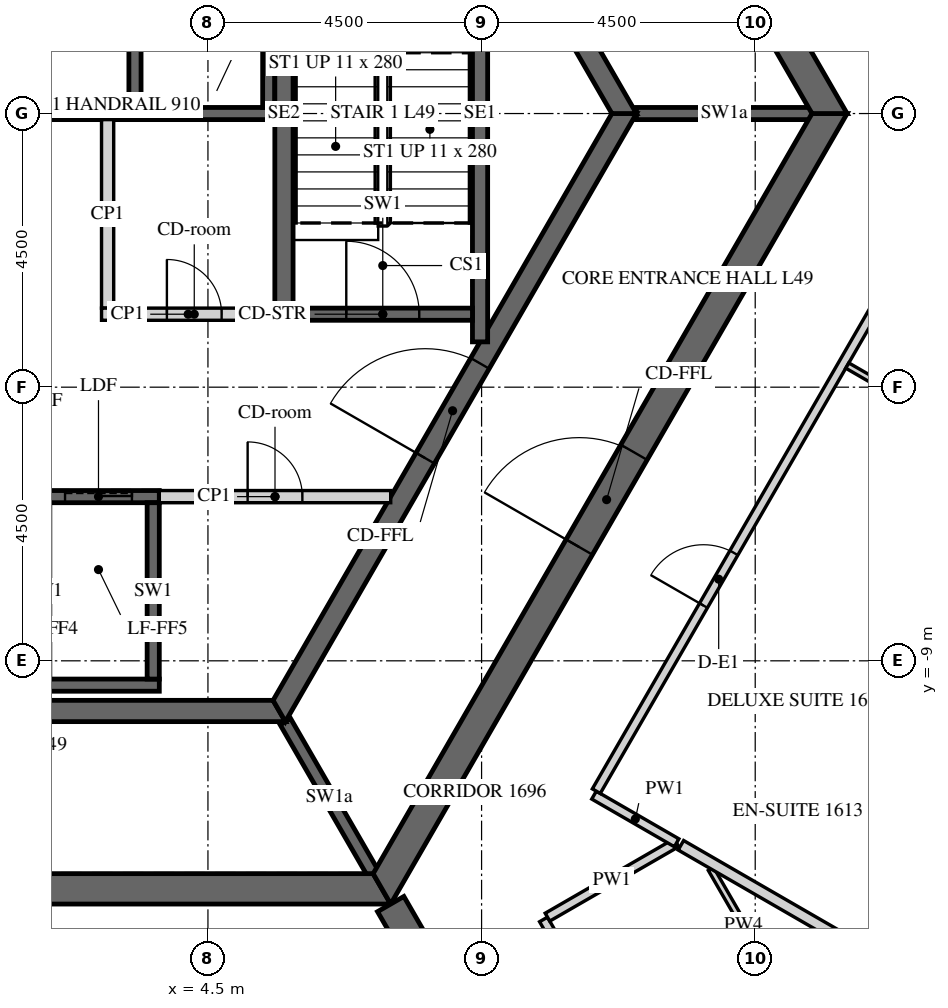
"""IFC4 building model, lengths in metres.
Left out: names, types, materials, properties, quantities, classifications, styles, units other than length and angle.
Written with IfcOpenShell. Run it as: python <this file> out.ifc"""

import sys

from ifc_helpers import new_model, si_unit, direction, frame, frame_2d, origin, place, context, subcontext, project, spatial, polyline, rectangle, outline, extrude, element, fill, save


model = new_model("IFC4")
c1 = context("Model", 3, precision=1e-05, world=origin(), true_north=direction((0.0, 1.0)))
c2 = subcontext(c1, "Body", "Model", "MODEL_VIEW")
j1 = project(units=[si_unit("LENGTHUNIT", "METRE"), si_unit("PLANEANGLEUNIT", "RADIAN")], contexts=[c1])
p1 = place(None, origin())
s1 = spatial("IfcSite", under=j1, at=p1, CompositionType="ELEMENT")
p2 = place(p1, origin())
s2 = spatial("IfcBuilding", under=s1, at=p2, CompositionType="ELEMENT")
p3 = place(p2, frame((0.0, 0.0, 207.3)))
s3 = spatial("IfcBuildingStorey", under=s2, at=p3, CompositionType="ELEMENT", Elevation=207.3)
p4 = place(p3, frame((-7.361, -12.75, -0.15), z_axis=(0.0, 0.0, 1.0), x_axis=(1.0, 0.0, 0.0)))
e1 = element("IfcWall", 1, at=p4, inside=s3, PredefinedType="SHEAR", context=c2, shape_type="SweptSolid", body=[
    extrude(outline(polyline([(-0.144, -0.25), (14.866, -0.25), (14.578, 0.25), (0.144, 0.25), (-0.144, -0.25)])), origin(), (0.0, 0.0, 1.0), 3.9),
])
p5 = place(p4, frame((6.761, 0.0, 0.15)))
e2 = element("IfcOpeningElement", 2, at=p5, cuts=e1, PredefinedType="OPENING", context=c2, shape_type="SweptSolid", body=[
    extrude(rectangle(XDim=1.2, YDim=2.4, at=frame_2d((0.6, 1.2))), frame((0.0, 0.26, 0.0), z_axis=(0.0, -1.0, 0.0), x_axis=(1.0, 0.0, 0.0)), (0.0, 0.0, 1.0), 0.52),
])
p6 = place(p3, frame((7.361, -12.75, -0.15), z_axis=(0.0, 0.0, 1.0), x_axis=(0.50000571537, 0.866022103989, 0.0)))
e3 = element("IfcWall", 3, at=p6, inside=s3, PredefinedType="SHEAR", context=c2, shape_type="SweptSolid", body=[
    extrude(outline(polyline([(-0.144, -0.25), (14.867, -0.25), (14.578, 0.25), (0.144, 0.25), (-0.144, -0.25)])), origin(), (0.0, 0.0, 1.0), 3.9),
])
p7 = place(p6, frame((6.49, 0.0, 0.15)))
e4 = element("IfcOpeningElement", 4, at=p7, cuts=e3, PredefinedType="OPENING", context=c2, shape_type="SweptSolid", body=[
    extrude(rectangle(XDim=1.8, YDim=2.4, at=frame_2d((0.9, 1.2))), frame((0.0, 0.26, 0.0), z_axis=(0.0, -1.0, 0.0), x_axis=(1.0, 0.0, 0.0)), (0.0, 0.0, 1.0), 0.52),
])
p8 = place(p3, frame((14.722, 0.0, -0.15), z_axis=(0.0, 0.0, 1.0), x_axis=(-0.50000571537, 0.866022103989, 0.0)))
e5 = element("IfcWall", 5, at=p8, inside=s3, PredefinedType="SHEAR", context=c2, shape_type="SweptSolid", body=[
    extrude(outline(polyline([(-0.144, -0.25), (14.867, -0.25), (14.578, 0.25), (0.144, 0.25), (-0.144, -0.25)])), origin(), (0.0, 0.0, 1.0), 3.9),
])
p9 = place(p8, frame((6.432, 0.0, 0.15)))
e6 = element("IfcOpeningElement", 6, at=p9, cuts=e5, PredefinedType="OPENING", context=c2, shape_type="SweptSolid", body=[
    extrude(rectangle(XDim=1.8, YDim=2.4, at=frame_2d((0.9, 1.2))), frame((0.0, 0.26, 0.0), z_axis=(0.0, -1.0, 0.0), x_axis=(1.0, 0.0, 0.0)), (0.0, 0.0, 1.0), 0.52),
])
p10 = place(p3, frame((7.506, -13.0, -0.15), z_axis=(0.0, 0.0, 1.0), x_axis=(0.499988271576, -0.866032175087, 0.0)))
e7 = element("IfcWall", 7, at=p10, inside=s3, PredefinedType="SHEAR", context=c2, shape_type="SweptSolid", body=[
    extrude(rectangle(XDim=15.424, YDim=0.5, at=frame_2d((7.712, 0.0))), origin(), (0.0, 0.0, 1.0), 3.9),
])
p11 = place(p10, frame((6.812, 0.0, 0.15)))
e8 = element("IfcOpeningElement", 8, at=p11, cuts=e7, PredefinedType="OPENING", context=c2, shape_type="SweptSolid", body=[
    extrude(rectangle(XDim=1.8, YDim=2.4, at=frame_2d((0.9, 1.2))), frame((0.0, 0.26, 0.0), z_axis=(0.0, -1.0, 0.0), x_axis=(1.0, 0.0, 0.0)), (0.0, 0.0, 1.0), 0.52),
])
p12 = place(p3, frame((-5.673, -9.825, -0.15), z_axis=(0.0, 0.0, 1.0), x_axis=(1.0, 0.0, 0.0)))
e9 = element("IfcWall", 9, at=p12, inside=s3, PredefinedType="SHEAR", context=c2, shape_type="SweptSolid", body=[
    extrude(outline(polyline([(-0.101, -0.175), (11.446, -0.175), (11.244, 0.175), (0.101, 0.175), (-0.101, -0.175)])), origin(), (0.0, 0.0, 1.0), 3.9),
])
p13 = place(p3, frame((5.673, -9.825, -0.15), z_axis=(0.0, 0.0, 1.0), x_axis=(0.499995046907, 0.866028263435, 0.0)))
e10 = element("IfcWall", 10, at=p13, inside=s3, PredefinedType="SHEAR", context=c2, shape_type="SweptSolid", body=[
    extrude(outline(polyline([(-0.101, -0.175), (11.446, -0.175), (11.244, 0.175), (0.101, 0.175), (-0.101, -0.175)])), origin(), (0.0, 0.0, 1.0), 3.9),
])
p14 = place(p13, frame((4.801, 0.0, 0.15)))
e11 = element("IfcOpeningElement", 11, at=p14, cuts=e10, PredefinedType="OPENING", context=c2, shape_type="SweptSolid", body=[
    extrude(rectangle(XDim=1.8, YDim=2.4, at=frame_2d((0.9, 1.2))), frame((0.0, 0.185, 0.0), z_axis=(0.0, -1.0, 0.0), x_axis=(1.0, 0.0, 0.0)), (0.0, 0.0, 1.0), 0.37),
])
p15 = place(p3, frame((11.345, 0.0, -0.15), z_axis=(0.0, 0.0, 1.0), x_axis=(-0.499995046907, 0.866028263435, 0.0)))
e12 = element("IfcWall", 12, at=p15, inside=s3, PredefinedType="SHEAR", context=c2, shape_type="SweptSolid", body=[
    extrude(outline(polyline([(-0.101, -0.175), (11.446, -0.175), (11.244, 0.175), (0.101, 0.175), (-0.101, -0.175)])), origin(), (0.0, 0.0, 1.0), 3.9),
])
p16 = place(p15, frame((4.744, 0.0, 0.15)))
e13 = element("IfcOpeningElement", 13, at=p16, cuts=e12, PredefinedType="OPENING", context=c2, shape_type="SweptSolid", body=[
    extrude(rectangle(XDim=1.8, YDim=2.4, at=frame_2d((0.9, 1.2))), frame((0.0, 0.185, 0.0), z_axis=(0.0, -1.0, 0.0), x_axis=(1.0, 0.0, 0.0)), (0.0, 0.0, 1.0), 0.37),
])
p17 = place(p3, frame((-5.6, 0.0, -0.25), z_axis=(0.0, 0.0, 1.0), x_axis=(1.0, 0.0, 0.0)))
e14 = element("IfcWall", 14, at=p17, inside=s3, PredefinedType="SHEAR", context=c2, shape_type="SweptSolid", body=[
    extrude(rectangle(XDim=11.2, YDim=0.2, at=frame_2d((5.6, 0.0))), origin(), (0.0, 0.0, 1.0), 3.9),
])
for number, where, z_axis, x_axis in (
    (15, (3.3, 0.1, -0.25), (0.0, 0.0, 1.0), (0.0, 1.0, 0.0)),
    (16, (5.5, 0.1, -0.25), (0.0, 0.0, 1.0), (0.0, 1.0, 0.0)),
):
    element("IfcWall", number, at=place(p3, frame(where, z_axis=z_axis, x_axis=x_axis)), inside=s3, PredefinedType="SHEAR", context=c2, shape_type="SweptSolid", body=[
        extrude(rectangle(XDim=3.1, YDim=0.2, at=frame_2d((1.55, 0.0))), origin(), (0.0, 0.0, 1.0), 3.9),
    ])
p18 = place(p3, frame((-5.5, -6.3, -0.25), z_axis=(0.0, 0.0, 1.0), x_axis=(1.0, 0.0, 0.0)))
e17 = element("IfcWall", 17, at=p18, inside=s3, PredefinedType="SHEAR", context=c2, shape_type="SweptSolid", body=[
    extrude(rectangle(XDim=9.2, YDim=0.2, at=frame_2d((4.6, 0.0))), origin(), (0.0, 0.0, 1.0), 3.9),
])
p19 = place(p18, frame((0.45, 0.0, 0.25)))
e18 = element("IfcOpeningElement", 18, at=p19, cuts=e17, PredefinedType="OPENING", context=c2, shape_type="SweptSolid", body=[
    extrude(rectangle(XDim=1.1, YDim=2.1, at=frame_2d((0.55, 1.05))), frame((0.0, 0.11, 0.0), z_axis=(0.0, -1.0, 0.0), x_axis=(1.0, 0.0, 0.0)), (0.0, 0.0, 1.0), 0.22),
])
p20 = place(p18, frame((2.25, 0.0, 0.25)))
e19 = element("IfcOpeningElement", 19, at=p20, cuts=e17, PredefinedType="OPENING", context=c2, shape_type="SweptSolid", body=[
    extrude(rectangle(XDim=1.1, YDim=2.1, at=frame_2d((0.55, 1.05))), frame((0.0, 0.11, 0.0), z_axis=(0.0, -1.0, 0.0), x_axis=(1.0, 0.0, 0.0)), (0.0, 0.0, 1.0), 0.22),
])
p21 = place(p18, frame((4.05, 0.0, 0.25)))
e20 = element("IfcOpeningElement", 20, at=p21, cuts=e17, PredefinedType="OPENING", context=c2, shape_type="SweptSolid", body=[
    extrude(rectangle(XDim=1.1, YDim=2.1, at=frame_2d((0.55, 1.05))), frame((0.0, 0.11, 0.0), z_axis=(0.0, -1.0, 0.0), x_axis=(1.0, 0.0, 0.0)), (0.0, 0.0, 1.0), 0.22),
])
p22 = place(p18, frame((5.85, 0.0, 0.25)))
e21 = element("IfcOpeningElement", 21, at=p22, cuts=e17, PredefinedType="OPENING", context=c2, shape_type="SweptSolid", body=[
    extrude(rectangle(XDim=1.1, YDim=2.1, at=frame_2d((0.55, 1.05))), frame((0.0, 0.11, 0.0), z_axis=(0.0, -1.0, 0.0), x_axis=(1.0, 0.0, 0.0)), (0.0, 0.0, 1.0), 0.22),
])
p23 = place(p18, frame((7.65, 0.0, 0.25)))
e22 = element("IfcOpeningElement", 22, at=p23, cuts=e17, PredefinedType="OPENING", context=c2, shape_type="SweptSolid", body=[
    extrude(rectangle(XDim=1.1, YDim=2.1, at=frame_2d((0.55, 1.05))), frame((0.0, 0.11, 0.0), z_axis=(0.0, -1.0, 0.0), x_axis=(1.0, 0.0, 0.0)), (0.0, 0.0, 1.0), 0.22),
])
p24 = place(p3, frame((-5.5, -9.4, -0.25), z_axis=(0.0, 0.0, 1.0), x_axis=(1.0, 0.0, 0.0)))
e23 = element("IfcWall", 23, at=p24, inside=s3, PredefinedType="SHEAR", context=c2, shape_type="SweptSolid", body=[
    extrude(rectangle(XDim=9.2, YDim=0.2, at=frame_2d((4.6, 0.0))), origin(), (0.0, 0.0, 1.0), 3.9),
])
p25 = place(p3, frame((3.6, -9.3, -0.25), z_axis=(0.0, 0.0, 1.0), x_axis=(0.0, 1.0, 0.0)))
e24 = element("IfcWall", 24, at=p25, inside=s3, PredefinedType="SHEAR", context=c2, shape_type="SweptSolid", body=[
    extrude(rectangle(XDim=2.9, YDim=0.2, at=frame_2d((1.45, 0.0))), origin(), (0.0, 0.0, 1.0), 3.9),
])
p26 = place(p3, frame((2.75, -3.3, 0.0), z_axis=(0.0, 0.0, 1.0), x_axis=(1.0, 0.0, 0.0)))
e25 = element("IfcWall", 25, at=p26, inside=s3, PredefinedType="PARTITIONING", context=c2, shape_type="SweptSolid", body=[
    extrude(rectangle(XDim=2.85, YDim=0.2, at=frame_2d((1.425, 0.0))), origin(), (0.0, 0.0, 1.0), 3.65),
])
p27 = place(p26, frame((1.075, 0.0, 0.0)))
e26 = element("IfcOpeningElement", 26, at=p27, cuts=e25, PredefinedType="OPENING", context=c2, shape_type="SweptSolid", body=[
    extrude(rectangle(XDim=0.9, YDim=2.1, at=frame_2d((0.45, 1.05))), frame((0.0, 0.11, 0.0), z_axis=(0.0, -1.0, 0.0), x_axis=(1.0, 0.0, 0.0)), (0.0, 0.0, 1.0), 0.22),
])
p28 = place(p3, frame((2.85, -3.2, 0.0), z_axis=(0.0, 0.0, 1.0), x_axis=(0.0, 1.0, 0.0)))
e27 = element("IfcWall", 27, at=p28, inside=s3, PredefinedType="PARTITIONING", context=c2, shape_type="SweptSolid", body=[
    extrude(rectangle(XDim=3.1, YDim=0.2, at=frame_2d((1.55, 0.0))), origin(), (0.0, 0.0, 1.0), 3.65),
])
p29 = place(p3, frame((3.7, -6.3, 0.0), z_axis=(0.0, 0.0, 1.0), x_axis=(1.0, 0.0, 0.0)))
e28 = element("IfcWall", 28, at=p29, inside=s3, PredefinedType="PARTITIONING", context=c2, shape_type="SweptSolid", body=[
    extrude(rectangle(XDim=3.806, YDim=0.2, at=frame_2d((1.903, 0.0))), origin(), (0.0, 0.0, 1.0), 3.65),
])
p30 = place(p29, frame((1.453, 0.0, 0.0)))
e29 = element("IfcOpeningElement", 29, at=p30, cuts=e28, PredefinedType="OPENING", context=c2, shape_type="SweptSolid", body=[
    extrude(rectangle(XDim=0.9, YDim=2.1, at=frame_2d((0.45, 1.05))), frame((0.0, 0.11, 0.0), z_axis=(0.0, -1.0, 0.0), x_axis=(1.0, 0.0, 0.0)), (0.0, 0.0, 1.0), 0.22),
])
for number, where, z_axis, x_axis in (
    (30, (11.547, 0.0, -0.15), (0.0, 0.0, 1.0), (1.0, 0.0, 0.0)),
    (31, (5.773, -10.0, -0.15), (0.0, 0.0, 1.0), (0.5, -0.866, 0.0)),
):
    element("IfcWall", number, at=place(p3, frame(where, z_axis=z_axis, x_axis=x_axis)), inside=s3, PredefinedType="SHEAR", context=c2, shape_type="SweptSolid", body=[
        extrude(rectangle(XDim=2.887, YDim=0.2, at=frame_2d((1.443, 0.0))), origin(), (0.0, 0.0, 1.0), 3.9),
    ])
p31 = place(p3, frame((5.75, -3.4, -0.25), z_axis=(0.0, 0.0, 1.0), x_axis=(0.0, 1.0, 0.0)))
e32 = element("IfcWall", 32, at=p31, inside=s3, PredefinedType="SHEAR", context=c2, shape_type="SweptSolid", body=[
    extrude(rectangle(XDim=6.8, YDim=0.3, at=frame_2d((3.4, 0.0))), origin(), (0.0, 0.0, 1.0), 3.9),
])
p32 = place(p3, frame((8.975, -3.755, -0.25), z_axis=(0.0, 0.0, 1.0), x_axis=(0.0, 1.0, 0.0)))
e33 = element("IfcWall", 33, at=p32, inside=s3, PredefinedType="SHEAR", context=c2, shape_type="SweptSolid", body=[
    extrude(rectangle(XDim=7.51, YDim=0.25, at=frame_2d((3.755, 0.0))), origin(), (0.0, 0.0, 1.0), 3.9),
])
p33 = place(p3, frame((5.9, -3.3, -0.25), z_axis=(0.0, 0.0, 1.0), x_axis=(1.0, 0.0, 0.0)))
e34 = element("IfcWall", 34, at=p33, inside=s3, PredefinedType="SHEAR", context=c2, shape_type="SweptSolid", body=[
    extrude(rectangle(XDim=2.95, YDim=0.2, at=frame_2d((1.475, 0.0))), origin(), (0.0, 0.0, 1.0), 3.9),
])
p34 = place(p33, frame((0.875, 0.0, 0.25)))
e35 = element("IfcOpeningElement", 35, at=p34, cuts=e34, PredefinedType="OPENING", context=c2, shape_type="SweptSolid", body=[
    extrude(rectangle(XDim=1.2, YDim=2.4, at=frame_2d((0.6, 1.2))), frame((0.0, 0.11, 0.0), z_axis=(0.0, -1.0, 0.0), x_axis=(1.0, 0.0, 0.0)), (0.0, 0.0, 1.0), 0.22),
])
p35 = place(p3, frame((13.699, -19.628, 0.0), z_axis=(0.0, 0.0, 1.0), x_axis=(-0.499995202058, 0.86602817386, 0.0)))
e36 = element("IfcWall", 36, at=p35, inside=s3, PredefinedType="PARTITIONING", context=c2, shape_type="SweptSolid", body=[
    extrude(rectangle(XDim=7.361, YDim=0.15, at=frame_2d((3.68, 0.0))), origin(), (0.0, 0.0, 1.0), 2.988),
])
p36 = place(p35, frame((1.918, 0.0, 0.0)))
e37 = element("IfcOpeningElement", 37, at=p36, cuts=e36, PredefinedType="OPENING", context=c2, shape_type="SweptSolid", body=[
    extrude(rectangle(XDim=1.0, YDim=2.1, at=frame_2d((0.5, 1.05))), frame((0.0, 0.085, 0.0), z_axis=(0.0, -1.0, 0.0), x_axis=(1.0, 0.0, 0.0)), (0.0, 0.0, 1.0), 0.17),
])
p37 = place(p3, frame((10.084, -13.216, 0.0), z_axis=(0.0, 0.0, 1.0), x_axis=(0.866026229868, 0.499998569178, 0.0)))
e38 = element("IfcWall", 38, at=p37, inside=s3, PredefinedType="PARTITIONING", context=c2, shape_type="SweptSolid", body=[
    extrude(rectangle(XDim=2.449, YDim=0.15, at=frame_2d((1.225, 0.0))), origin(), (0.0, 0.0, 1.0), 2.988),
])
p38 = place(p3, frame((12.208, -11.993, 0.0), z_axis=(0.0, 0.0, 1.0), x_axis=(-0.866011891242, 0.50002340368, 0.0)))
e39 = element("IfcWall", 39, at=p38, inside=s3, PredefinedType="PARTITIONING", context=c2, shape_type="SweptSolid", body=[
    extrude(rectangle(XDim=1.568, YDim=0.15, at=frame_2d((0.784, 0.0))), origin(), (0.0, 0.0, 1.0), 2.988),
])
p39 = place(p3, frame((10.887, -11.144, 0.0), z_axis=(0.0, 0.0, 1.0), x_axis=(0.500006037985, 0.866021917724, 0.0)))
e40 = element("IfcWall", 40, at=p39, inside=s3, PredefinedType="PARTITIONING", context=c2, shape_type="SweptSolid", body=[
    extrude(rectangle(XDim=12.867, YDim=0.15, at=frame_2d((6.434, 0.0))), origin(), (0.0, 0.0, 1.0), 2.988),
])
p40 = place(p39, frame((3.525, 0.0, 0.0)))
e41 = element("IfcOpeningElement", 41, at=p40, cuts=e40, PredefinedType="OPENING", context=c2, shape_type="SweptSolid", body=[
    extrude(rectangle(XDim=1.0, YDim=2.1, at=frame_2d((0.5, 1.05))), frame((0.0, 0.085, 0.0), z_axis=(0.0, -1.0, 0.0), x_axis=(1.0, 0.0, 0.0)), (0.0, 0.0, 1.0), 0.17),
])
p41 = place(p3, frame((17.277, 0.075, 0.0), z_axis=(0.0, 0.0, 1.0), x_axis=(-0.499988884089, 0.866031821464, 0.0)))
e42 = element("IfcWall", 42, at=p41, inside=s3, PredefinedType="PARTITIONING", context=c2, shape_type="SweptSolid", body=[
    extrude(rectangle(XDim=14.78, YDim=0.15, at=frame_2d((7.39, 0.0))), origin(), (0.0, 0.0, 1.0), 2.988),
])
p42 = place(p41, frame((1.001, 0.0, 0.0)))
e43 = element("IfcOpeningElement", 43, at=p42, cuts=e42, PredefinedType="OPENING", context=c2, shape_type="SweptSolid", body=[
    extrude(rectangle(XDim=1.0, YDim=2.1, at=frame_2d((0.5, 1.05))), frame((0.0, 0.085, 0.0), z_axis=(0.0, -1.0, 0.0), x_axis=(1.0, 0.0, 0.0)), (0.0, 0.0, 1.0), 0.17),
])
p43 = place(p41, frame((5.0, 0.0, 0.0)))
e44 = element("IfcOpeningElement", 44, at=p43, cuts=e42, PredefinedType="OPENING", context=c2, shape_type="SweptSolid", body=[
    extrude(rectangle(XDim=1.0, YDim=2.1, at=frame_2d((0.5, 1.05))), frame((0.0, 0.085, 0.0), z_axis=(0.0, -1.0, 0.0), x_axis=(1.0, 0.0, 0.0)), (0.0, 0.0, 1.0), 0.17),
])
p44 = place(p41, frame((10.79, 0.0, 0.0)))
e45 = element("IfcOpeningElement", 45, at=p44, cuts=e42, PredefinedType="OPENING", context=c2, shape_type="SweptSolid", body=[
    extrude(rectangle(XDim=1.0, YDim=2.1, at=frame_2d((0.5, 1.05))), frame((0.0, 0.085, 0.0), z_axis=(0.0, -1.0, 0.0), x_axis=(1.0, 0.0, 0.0)), (0.0, 0.0, 1.0), 0.17),
])
p45 = place(p3, frame((12.772, -12.423, 0.0), z_axis=(0.0, 0.0, 1.0), x_axis=(0.500061136393, -0.865990103794, 0.0)))
e46 = element("IfcWall", 46, at=p45, inside=s3, PredefinedType="PARTITIONING", context=c2, shape_type="SweptSolid", body=[
    extrude(rectangle(XDim=2.142, YDim=0.1, at=frame_2d((1.071, 0.0))), origin(), (0.0, 0.0, 1.0), 2.988),
])
p46 = place(p3, frame((21.631, -17.433, 0.0), z_axis=(0.0, 0.0, 1.0), x_axis=(-0.866029744906, 0.499992480882, 0.0)))
e47 = element("IfcWall", 47, at=p46, inside=s3, PredefinedType="PARTITIONING", context=c2, shape_type="SweptSolid", body=[
    extrude(rectangle(XDim=10.801, YDim=0.18, at=frame_2d((5.4, 0.0))), origin(), (0.0, 0.0, 1.0), 2.988),
])
p47 = place(p3, frame((17.331, -5.482, 0.0), z_axis=(0.0, 0.0, 1.0), x_axis=(-0.86604424267, 0.499967368674, 0.0)))
e48 = element("IfcWall", 48, at=p47, inside=s3, PredefinedType="PARTITIONING", context=c2, shape_type="SweptSolid", body=[
    extrude(rectangle(XDim=2.675, YDim=0.1, at=frame_2d((1.337, 0.0))), origin(), (0.0, 0.0, 1.0), 2.988),
])
p48 = place(p47, frame((0.95, 0.0, 0.0)))
e49 = element("IfcOpeningElement", 49, at=p48, cuts=e48, PredefinedType="OPENING", context=c2, shape_type="SweptSolid", body=[
    extrude(rectangle(XDim=0.8, YDim=2.1, at=frame_2d((0.4, 1.05))), frame((0.0, 0.06, 0.0), z_axis=(0.0, -1.0, 0.0), x_axis=(1.0, 0.0, 0.0)), (0.0, 0.0, 1.0), 0.12),
])
p49 = place(p7, origin())
e50 = element("IfcDoor", 50, at=p49, inside=s3, OperationType="DOUBLE_DOOR_SINGLE_SWING", PredefinedType="DOOR", context=c2, shape_type="SweptSolid", body=[
    extrude(rectangle(XDim=1.8, YDim=2.4, at=frame_2d((0.9, 1.2))), frame((0.0, 0.025, 0.0), z_axis=(0.0, -1.0, 0.0), x_axis=(1.0, 0.0, 0.0)), (0.0, 0.0, 1.0), 0.05),
])
fill(e4, e50)
p50 = place(p14, origin())
e51 = element("IfcDoor", 51, at=p50, inside=s3, OperationType="DOUBLE_DOOR_SINGLE_SWING", PredefinedType="DOOR", context=c2, shape_type="SweptSolid", body=[
    extrude(rectangle(XDim=1.8, YDim=2.4, at=frame_2d((0.9, 1.2))), frame((0.0, 0.025, 0.0), z_axis=(0.0, -1.0, 0.0), x_axis=(1.0, 0.0, 0.0)), (0.0, 0.0, 1.0), 0.05),
])
fill(e11, e51)
p51 = place(p27, origin())
e52 = element("IfcDoor", 52, at=p51, inside=s3, OperationType="SINGLE_SWING_LEFT", PredefinedType="DOOR", context=c2, shape_type="SweptSolid", body=[
    extrude(rectangle(XDim=0.9, YDim=2.1, at=frame_2d((0.45, 1.05))), frame((0.0, 0.025, 0.0), z_axis=(0.0, -1.0, 0.0), x_axis=(1.0, 0.0, 0.0)), (0.0, 0.0, 1.0), 0.05),
])
fill(e26, e52)
p52 = place(p30, origin())
e53 = element("IfcDoor", 53, at=p52, inside=s3, OperationType="SINGLE_SWING_LEFT", PredefinedType="DOOR", context=c2, shape_type="SweptSolid", body=[
    extrude(rectangle(XDim=0.9, YDim=2.1, at=frame_2d((0.45, 1.05))), frame((0.0, 0.025, 0.0), z_axis=(0.0, -1.0, 0.0), x_axis=(1.0, 0.0, 0.0)), (0.0, 0.0, 1.0), 0.05),
])
fill(e29, e53)
p53 = place(p34, origin())
e54 = element("IfcDoor", 54, at=p53, inside=s3, OperationType="SINGLE_SWING_LEFT", PredefinedType="DOOR", context=c2, shape_type="SweptSolid", body=[
    extrude(rectangle(XDim=1.2, YDim=2.4, at=frame_2d((0.6, 1.2))), frame((0.0, 0.025, 0.0), z_axis=(0.0, -1.0, 0.0), x_axis=(1.0, 0.0, 0.0)), (0.0, 0.0, 1.0), 0.05),
])
fill(e35, e54)
p54 = place(p23, origin())
e55 = element("IfcDoor", 55, at=p54, inside=s3, OperationType="SLIDING_TO_LEFT", PredefinedType="DOOR", context=c2, shape_type="SweptSolid", body=[
    extrude(rectangle(XDim=1.1, YDim=2.1, at=frame_2d((0.55, 1.05))), frame((0.0, 0.025, 0.0), z_axis=(0.0, -1.0, 0.0), x_axis=(1.0, 0.0, 0.0)), (0.0, 0.0, 1.0), 0.05),
])
fill(e22, e55)
p55 = place(p40, origin())
e56 = element("IfcDoor", 56, at=p55, inside=s3, OperationType="SINGLE_SWING_RIGHT", PredefinedType="DOOR", context=c2, shape_type="SweptSolid", body=[
    extrude(rectangle(XDim=1.0, YDim=2.1, at=frame_2d((0.5, 1.05))), frame((0.0, 0.025, 0.0), z_axis=(0.0, -1.0, 0.0), x_axis=(1.0, 0.0, 0.0)), (0.0, 0.0, 1.0), 0.05),
])
fill(e41, e56)
save(model, sys.argv[1])
